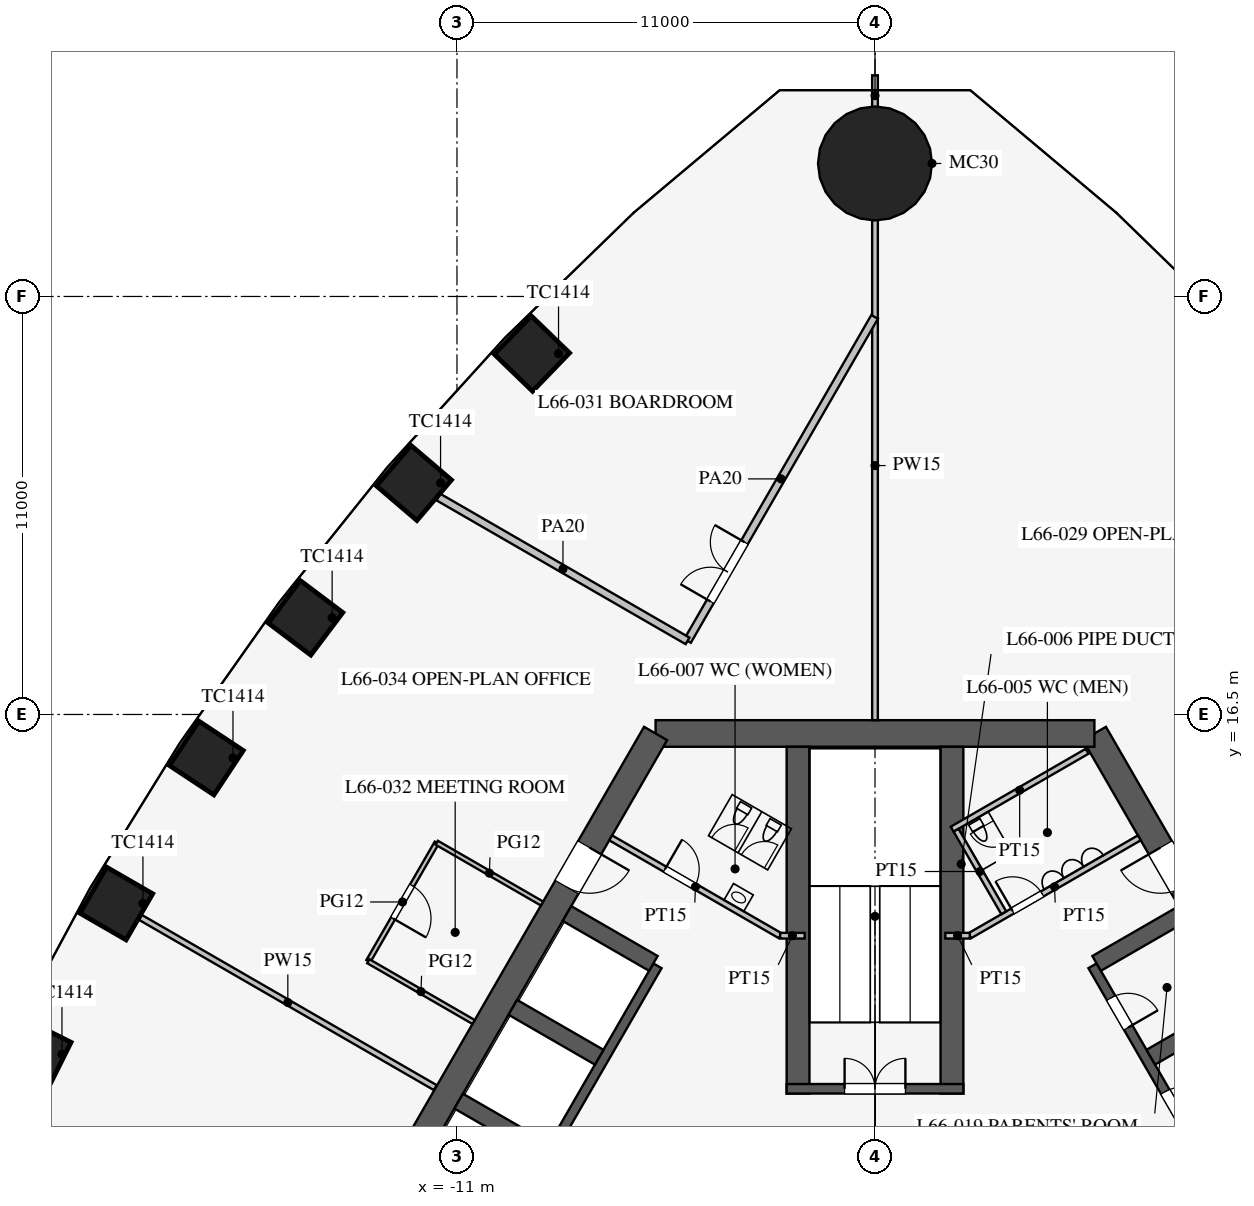
"""IFC4 building model, lengths in metres.
Left out: names, types, materials, properties, quantities, classifications, styles, units other than length and angle.
Written with IfcOpenShell. Run it as: python <this file> out.ifc"""

import sys

from ifc_helpers import new_model, si_unit, direction, frame, frame_2d, origin, origin_2d, place, context, subcontext, project, spatial, rectangle, circle, extrude, element, fill, save


model = new_model("IFC4")
c1 = context("Model", 3, precision=1e-05, world=origin(), true_north=direction((0.0, 1.0)))
c2 = subcontext(c1, "Body", "Model", "MODEL_VIEW")
j1 = project(units=[si_unit("LENGTHUNIT", "METRE"), si_unit("PLANEANGLEUNIT", "RADIAN")], contexts=[c1])
p1 = place(None, origin())
s1 = spatial("IfcSite", under=j1, at=p1, CompositionType="ELEMENT")
p2 = place(p1, origin())
s2 = spatial("IfcBuilding", under=s1, at=p2, CompositionType="ELEMENT")
p3 = place(p2, frame((0.0, 0.0, 288.9)))
s3 = spatial("IfcBuildingStorey", under=s2, at=p3, CompositionType="ELEMENT", Elevation=288.9)
for number, where, z_axis, x_axis in (
    (1, (-9.027, 25.997, 0.0), (0.0, 0.0, 1.0), (-0.695, -0.719, 0.0)),
    (2, (-12.132, 22.593, 0.0), (0.0, 0.0, 1.0), (-0.649, -0.761, 0.0)),
    (3, (-14.985, 19.044, 0.0), (0.0, 0.0, 1.0), (-0.601, -0.799, 0.0)),
    (4, (-17.594, 15.354, 0.0), (0.0, 0.0, 1.0), (-0.552, -0.834, 0.0)),
    (5, (-19.963, 11.526, 0.0), (0.0, 0.0, 1.0), (-0.5, -0.866, 0.0)),
    (6, (-22.094, 7.56, 0.0), (0.0, 0.0, 1.0), (-0.447, -0.895, 0.0)),
):
    element("IfcColumn", number, at=place(p3, frame(where, z_axis=z_axis, x_axis=x_axis)), inside=s3, PredefinedType="COLUMN", context=c2, shape_type="SweptSolid", body=[
        extrude(rectangle(XDim=1.4, YDim=1.4, at=origin_2d()), origin(), (0.0, 0.0, 1.0), 4.2),
    ])
p4 = place(p3, frame((0.0, 31.0, 0.0), z_axis=(0.0, 0.0, 1.0), x_axis=(1.0, 0.0, 0.0)))
e7 = element("IfcColumn", 7, at=p4, inside=s3, PredefinedType="COLUMN", context=c2, shape_type="SweptSolid", body=[
    extrude(circle(Radius=1.5, at=origin_2d()), origin(), (0.0, 0.0, 1.0), 4.2),
])
p5 = place(p3, frame((16.743, -3.0, 0.0), z_axis=(0.0, 0.0, 1.0), x_axis=(-0.500002442456, 0.866023993627, 0.0)))
e8 = element("IfcWall", 8, at=p5, inside=s3, PredefinedType="SHEAR", context=c2, shape_type="SweptSolid", body=[
    extrude(rectangle(XDim=21.939, YDim=0.7, at=frame_2d((10.97, 0.0))), origin(), (0.0, 0.0, 1.0), 4.2),
])
p6 = place(p5, frame((17.27, 0.0, 0.0)))
e9 = element("IfcOpeningElement", 9, at=p6, cuts=e8, PredefinedType="OPENING", context=c2, shape_type="SweptSolid", body=[
    extrude(rectangle(XDim=1.2, YDim=2.1, at=frame_2d((0.6, 1.05))), frame((0.0, 0.36, 0.0), z_axis=(0.0, -1.0, 0.0), x_axis=(1.0, 0.0, 0.0)), (0.0, 0.0, 1.0), 0.72),
])
p7 = place(p5, frame((3.47, 0.0, 0.0)))
e10 = element("IfcOpeningElement", 10, at=p7, cuts=e8, PredefinedType="OPENING", context=c2, shape_type="SweptSolid", body=[
    extrude(rectangle(XDim=1.2, YDim=2.1, at=frame_2d((0.6, 1.05))), frame((0.0, 0.36, 0.0), z_axis=(0.0, -1.0, 0.0), x_axis=(1.0, 0.0, 0.0)), (0.0, 0.0, 1.0), 0.72),
])
p8 = place(p3, frame((5.773, 16.0, 0.0), z_axis=(0.0, 0.0, 1.0), x_axis=(-1.0, 0.0, 0.0)))
e11 = element("IfcWall", 11, at=p8, inside=s3, PredefinedType="SHEAR", context=c2, shape_type="SweptSolid", body=[
    extrude(rectangle(XDim=11.547, YDim=0.7, at=frame_2d((5.773, 0.0))), origin(), (0.0, 0.0, 1.0), 4.2),
])
p9 = place(p3, frame((-5.773, 16.0, 0.0), z_axis=(0.0, 0.0, 1.0), x_axis=(-0.500002442456, -0.866023993627, 0.0)))
e12 = element("IfcWall", 12, at=p9, inside=s3, PredefinedType="SHEAR", context=c2, shape_type="SweptSolid", body=[
    extrude(rectangle(XDim=21.939, YDim=0.7, at=frame_2d((10.97, 0.0))), origin(), (0.0, 0.0, 1.0), 4.2),
])
p10 = place(p9, frame((17.27, 0.0, 0.0)))
e13 = element("IfcOpeningElement", 13, at=p10, cuts=e12, PredefinedType="OPENING", context=c2, shape_type="SweptSolid", body=[
    extrude(rectangle(XDim=1.2, YDim=2.1, at=frame_2d((0.6, 1.05))), frame((0.0, 0.36, 0.0), z_axis=(0.0, -1.0, 0.0), x_axis=(1.0, 0.0, 0.0)), (0.0, 0.0, 1.0), 0.72),
])
p11 = place(p9, frame((3.47, 0.0, 0.0)))
e14 = element("IfcOpeningElement", 14, at=p11, cuts=e12, PredefinedType="OPENING", context=c2, shape_type="SweptSolid", body=[
    extrude(rectangle(XDim=1.2, YDim=2.1, at=frame_2d((0.6, 1.05))), frame((0.0, 0.36, 0.0), z_axis=(0.0, -1.0, 0.0), x_axis=(1.0, 0.0, 0.0)), (0.0, 0.0, 1.0), 0.72),
])
p12 = place(p3, frame((11.424, 0.014, 0.0), z_axis=(0.0, 0.0, 1.0), x_axis=(-0.500001763848, 0.866024385424, 0.0)))
e15 = element("IfcWall", 15, at=p12, inside=s3, PredefinedType="SHEAR", context=c2, shape_type="SweptSolid", body=[
    extrude(rectangle(XDim=11.4, YDim=0.25, at=frame_2d((5.7, 0.0))), origin(), (0.0, 0.0, 1.0), 4.2),
])
p13 = place(p12, frame((0.975, 0.0, 0.0)))
e16 = element("IfcOpeningElement", 16, at=p13, cuts=e15, PredefinedType="OPENING", context=c2, shape_type="SweptSolid", body=[
    extrude(rectangle(XDim=0.9, YDim=2.1, at=frame_2d((0.45, 1.05))), frame((0.0, 0.135, 0.0), z_axis=(0.0, -1.0, 0.0), x_axis=(1.0, 0.0, 0.0)), (0.0, 0.0, 1.0), 0.27),
])
p14 = place(p12, frame((3.825, 0.0, 0.0)))
e17 = element("IfcOpeningElement", 17, at=p14, cuts=e15, PredefinedType="OPENING", context=c2, shape_type="SweptSolid", body=[
    extrude(rectangle(XDim=0.9, YDim=2.1, at=frame_2d((0.45, 1.05))), frame((0.0, 0.135, 0.0), z_axis=(0.0, -1.0, 0.0), x_axis=(1.0, 0.0, 0.0)), (0.0, 0.0, 1.0), 0.27),
])
p15 = place(p12, frame((6.675, 0.0, 0.0)))
e18 = element("IfcOpeningElement", 18, at=p15, cuts=e15, PredefinedType="OPENING", context=c2, shape_type="SweptSolid", body=[
    extrude(rectangle(XDim=0.9, YDim=2.1, at=frame_2d((0.45, 1.05))), frame((0.0, 0.135, 0.0), z_axis=(0.0, -1.0, 0.0), x_axis=(1.0, 0.0, 0.0)), (0.0, 0.0, 1.0), 0.27),
])
p16 = place(p12, frame((9.525, 0.0, 0.0)))
e19 = element("IfcOpeningElement", 19, at=p16, cuts=e15, PredefinedType="OPENING", context=c2, shape_type="SweptSolid", body=[
    extrude(rectangle(XDim=0.9, YDim=2.1, at=frame_2d((0.45, 1.05))), frame((0.0, 0.135, 0.0), z_axis=(0.0, -1.0, 0.0), x_axis=(1.0, 0.0, 0.0)), (0.0, 0.0, 1.0), 0.27),
])
for number, where, z_axis, x_axis in (
    (20, (7.257, 7.481, 0.0), (0.0, 0.0, 1.0), (0.866, 0.5, 0.0)),
    (21, (5.832, 9.949, 0.0), (0.0, 0.0, 1.0), (0.866, 0.5, 0.0)),
):
    element("IfcWall", number, at=place(p3, frame(where, z_axis=z_axis, x_axis=x_axis)), inside=s3, PredefinedType="SHEAR", context=c2, shape_type="SweptSolid", body=[
        extrude(rectangle(XDim=2.625, YDim=0.45, at=frame_2d((1.312, 0.0))), origin(), (0.0, 0.0, 1.0), 4.2),
    ])
p17 = place(p3, frame((-5.724, 9.886, 0.0), z_axis=(0.0, 0.0, 1.0), x_axis=(-0.500001763848, -0.866024385424, 0.0)))
e22 = element("IfcWall", 22, at=p17, inside=s3, PredefinedType="SHEAR", context=c2, shape_type="SweptSolid", body=[
    extrude(rectangle(XDim=11.4, YDim=0.25, at=frame_2d((5.7, 0.0))), origin(), (0.0, 0.0, 1.0), 4.2),
])
p18 = place(p17, frame((6.525, 0.0, 0.0)))
e23 = element("IfcOpeningElement", 23, at=p18, cuts=e22, PredefinedType="OPENING", context=c2, shape_type="SweptSolid", body=[
    extrude(rectangle(XDim=1.2, YDim=2.2, at=frame_2d((0.6, 1.1))), frame((0.0, 0.135, 0.0), z_axis=(0.0, -1.0, 0.0), x_axis=(1.0, 0.0, 0.0)), (0.0, 0.0, 1.0), 0.27),
])
p19 = place(p17, frame((9.375, 0.0, 0.0)))
e24 = element("IfcOpeningElement", 24, at=p19, cuts=e22, PredefinedType="OPENING", context=c2, shape_type="SweptSolid", body=[
    extrude(rectangle(XDim=1.2, YDim=2.2, at=frame_2d((0.6, 1.1))), frame((0.0, 0.135, 0.0), z_axis=(0.0, -1.0, 0.0), x_axis=(1.0, 0.0, 0.0)), (0.0, 0.0, 1.0), 0.27),
])
for number, where, z_axis, x_axis in (
    (25, (-5.832, 9.949, 0.0), (0.0, 0.0, 1.0), (-0.866, 0.5, 0.0)),
    (26, (-7.257, 7.481, 0.0), (0.0, 0.0, 1.0), (-0.866, 0.5, 0.0)),
    (27, (-8.682, 5.012, 0.0), (0.0, 0.0, 1.0), (-0.866, 0.5, 0.0)),
):
    element("IfcWall", number, at=place(p3, frame(where, z_axis=z_axis, x_axis=x_axis)), inside=s3, PredefinedType="SHEAR", context=c2, shape_type="SweptSolid", body=[
        extrude(rectangle(XDim=2.625, YDim=0.45, at=frame_2d((1.312, 0.0))), origin(), (0.0, 0.0, 1.0), 4.2),
    ])
for number, where, z_axis, x_axis in (
    (28, (2.025, 6.525, 0.0), (0.0, 0.0, 1.0), (0.0, 1.0, 0.0)),
    (29, (-2.025, 6.525, 0.0), (0.0, 0.0, 1.0), (0.0, 1.0, 0.0)),
):
    element("IfcWall", number, at=place(p3, frame(where, z_axis=z_axis, x_axis=x_axis)), inside=s3, PredefinedType="SHEAR", context=c2, shape_type="SweptSolid", body=[
        extrude(rectangle(XDim=9.125, YDim=0.6, at=frame_2d((4.562, 0.0))), origin(), (0.0, 0.0, 1.0), 4.2),
    ])
p20 = place(p3, frame((2.325, 6.65, 0.0), z_axis=(0.0, 0.0, 1.0), x_axis=(-1.0, 0.0, 0.0)))
e30 = element("IfcWall", 30, at=p20, inside=s3, PredefinedType="SHEAR", context=c2, shape_type="SweptSolid", body=[
    extrude(rectangle(XDim=4.65, YDim=0.25, at=frame_2d((2.325, 0.0))), origin(), (0.0, 0.0, 1.0), 4.2),
])
p21 = place(p20, frame((1.525, 0.0, 0.0)))
e31 = element("IfcOpeningElement", 31, at=p21, cuts=e30, PredefinedType="OPENING", context=c2, shape_type="SweptSolid", body=[
    extrude(rectangle(XDim=1.6, YDim=2.1, at=frame_2d((0.8, 1.05))), frame((0.0, 0.135, 0.0), z_axis=(0.0, -1.0, 0.0), x_axis=(1.0, 0.0, 0.0)), (0.0, 0.0, 1.0), 0.27),
])
p22 = place(p3, frame((2.495, 10.678, 0.0), z_axis=(0.0, 0.0, 1.0), x_axis=(0.866037967349, 0.499978238636, 0.0)))
e32 = element("IfcWall", 32, at=p22, inside=s3, PredefinedType="PARTITIONING", context=c2, shape_type="SweptSolid", body=[
    extrude(rectangle(XDim=5.15, YDim=0.15, at=frame_2d((2.575, 0.0))), origin(), (0.0, 0.0, 1.0), 4.0),
])
p23 = place(p22, frame((1.3, 0.0, 0.0)))
e33 = element("IfcOpeningElement", 33, at=p23, cuts=e32, PredefinedType="OPENING", context=c2, shape_type="SweptSolid", body=[
    extrude(rectangle(XDim=0.9, YDim=2.1, at=frame_2d((0.45, 1.05))), frame((0.0, 0.085, 0.0), z_axis=(0.0, -1.0, 0.0), x_axis=(1.0, 0.0, 0.0)), (0.0, 0.0, 1.0), 0.17),
])
p24 = place(p3, frame((-2.495, 10.678, 0.0), z_axis=(0.0, 0.0, 1.0), x_axis=(-0.866037967349, 0.499978238636, 0.0)))
e34 = element("IfcWall", 34, at=p24, inside=s3, PredefinedType="PARTITIONING", context=c2, shape_type="SweptSolid", body=[
    extrude(rectangle(XDim=5.15, YDim=0.15, at=frame_2d((2.575, 0.0))), origin(), (0.0, 0.0, 1.0), 4.0),
])
p25 = place(p24, frame((2.6, 0.0, 0.0)))
e35 = element("IfcOpeningElement", 35, at=p25, cuts=e34, PredefinedType="OPENING", context=c2, shape_type="SweptSolid", body=[
    extrude(rectangle(XDim=0.9, YDim=2.1, at=frame_2d((0.45, 1.05))), frame((0.0, 0.085, 0.0), z_axis=(0.0, -1.0, 0.0), x_axis=(1.0, 0.0, 0.0)), (0.0, 0.0, 1.0), 0.17),
])
for number, where, z_axis, x_axis in (
    (36, (2.495, 10.678, 0.0), (0.0, 0.0, 1.0), (-1.0, 0.0, 0.0)),
    (37, (-2.495, 10.678, 0.0), (0.0, 0.0, 1.0), (1.0, 0.0, 0.0)),
):
    element("IfcWall", number, at=place(p3, frame(where, z_axis=z_axis, x_axis=x_axis)), inside=s3, PredefinedType="PARTITIONING", context=c2, shape_type="SweptSolid", body=[
        extrude(rectangle(XDim=0.645, YDim=0.15, at=frame_2d((0.323, 0.0))), origin(), (0.0, 0.0, 1.0), 4.0),
    ])
p26 = place(p3, frame((2.031, 13.482, 0.0), z_axis=(0.0, 0.0, 1.0), x_axis=(0.866050731258, 0.499956128963, 0.0)))
e38 = element("IfcWall", 38, at=p26, inside=s3, PredefinedType="PARTITIONING", context=c2, shape_type="SweptSolid", body=[
    extrude(rectangle(XDim=4.1, YDim=0.15, at=frame_2d((2.05, 0.0))), origin(), (0.0, 0.0, 1.0), 4.0),
])
p27 = place(p3, frame((3.389, 11.281, 0.0), z_axis=(0.0, 0.0, 1.0), x_axis=(-0.499989096993, 0.866031698547, 0.0)))
e39 = element("IfcWall", 39, at=p27, inside=s3, PredefinedType="PARTITIONING", context=c2, shape_type="SweptSolid", body=[
    extrude(rectangle(XDim=2.51, YDim=0.15, at=frame_2d((1.255, 0.0))), origin(), (0.0, 0.0, 1.0), 4.0),
])
p28 = place(p3, frame((0.0, 16.35, 0.0), z_axis=(0.0, 0.0, 1.0), x_axis=(0.0, 1.0, 0.0)))
e40 = element("IfcWall", 40, at=p28, inside=s3, PredefinedType="PARTITIONING", context=c2, shape_type="SweptSolid", body=[
    extrude(rectangle(XDim=13.4, YDim=0.15, at=frame_2d((6.7, 0.0))), origin(), (0.0, 0.0, 1.0), 2.5),
])
p29 = place(p3, frame((0.0, 32.25, 0.0), z_axis=(0.0, 0.0, 1.0), x_axis=(0.0, 1.0, 0.0)))
e41 = element("IfcWall", 41, at=p29, inside=s3, PredefinedType="PARTITIONING", context=c2, shape_type="SweptSolid", body=[
    extrude(rectangle(XDim=1.07, YDim=0.15, at=frame_2d((0.535, 0.0))), origin(), (0.0, 0.0, 1.0), 2.5),
])
p30 = place(p3, frame((-4.933, 18.436, 0.0), z_axis=(0.0, 0.0, 1.0), x_axis=(0.500003655525, 0.866023293256, 0.0)))
e42 = element("IfcWall", 42, at=p30, inside=s3, PredefinedType="PARTITIONING", context=c2, shape_type="SweptSolid", body=[
    extrude(rectangle(XDim=9.845, YDim=0.2, at=frame_2d((4.923, 0.0))), origin(), (0.0, 0.0, 1.0), 2.9),
])
p31 = place(p30, frame((1.2, 0.0, 0.15)))
e43 = element("IfcOpeningElement", 43, at=p31, cuts=e42, PredefinedType="OPENING", context=c2, shape_type="SweptSolid", body=[
    extrude(rectangle(XDim=1.8, YDim=2.1, at=frame_2d((0.9, 1.05))), frame((0.0, 0.11, 0.0), z_axis=(0.0, -1.0, 0.0), x_axis=(1.0, 0.0, 0.0)), (0.0, 0.0, 1.0), 0.22),
])
p32 = place(p3, frame((-11.57, 6.68, 0.0), z_axis=(0.0, 0.0, 1.0), x_axis=(-0.866018180823, 0.500012510328, 0.0)))
e44 = element("IfcWall", 44, at=p32, inside=s3, PredefinedType="PARTITIONING", context=c2, shape_type="SweptSolid", body=[
    extrude(rectangle(XDim=8.962, YDim=0.15, at=frame_2d((4.481, 0.0))), origin(), (0.0, 0.0, 1.0), 3.3),
])
p33 = place(p3, frame((-11.533, 13.125, 0.0), z_axis=(0.0, 0.0, 1.0), x_axis=(-0.500012057535, -0.866018442252, 0.0)))
e45 = element("IfcWall", 45, at=p33, inside=s3, PredefinedType="PARTITIONING", context=c2, shape_type="SweptSolid", body=[
    extrude(rectangle(XDim=3.6, YDim=0.12, at=frame_2d((1.8, 0.0))), origin(), (0.0, 0.0, 1.0), 2.9),
])
p34 = place(p33, frame((1.3, 0.0, 0.15)))
e46 = element("IfcOpeningElement", 46, at=p34, cuts=e45, PredefinedType="OPENING", context=c2, shape_type="SweptSolid", body=[
    extrude(rectangle(XDim=1.0, YDim=2.1, at=frame_2d((0.5, 1.05))), frame((0.0, 0.07, 0.0), z_axis=(0.0, -1.0, 0.0), x_axis=(1.0, 0.0, 0.0)), (0.0, 0.0, 1.0), 0.14),
])
for number, where, z_axis, x_axis in (
    (47, (-10.562, 8.407, 0.0), (0.0, 0.0, 1.0), (-0.866, 0.5, 0.0)),
    (48, (-8.761, 11.525, 0.0), (0.0, 0.0, 1.0), (-0.866, 0.5, 0.0)),
):
    element("IfcWall", number, at=place(p3, frame(where, z_axis=z_axis, x_axis=x_axis)), inside=s3, PredefinedType="PARTITIONING", context=c2, shape_type="SweptSolid", body=[
        extrude(rectangle(XDim=3.2, YDim=0.12, at=frame_2d((1.6, 0.0))), origin(), (0.0, 0.0, 1.0), 2.9),
    ])
p35 = place(p3, frame((-4.933, 18.436, 0.0), z_axis=(0.0, 0.0, 1.0), x_axis=(-0.866021793822, 0.500006252586, 0.0)))
e49 = element("IfcWall", 49, at=p35, inside=s3, PredefinedType="PARTITIONING", context=c2, shape_type="SweptSolid", body=[
    extrude(rectangle(XDim=7.571, YDim=0.2, at=frame_2d((3.785, 0.0))), origin(), (0.0, 0.0, 1.0), 2.9),
])
p36 = place(p23, origin())
e50 = element("IfcDoor", 50, at=p36, inside=s3, OperationType="SINGLE_SWING_LEFT", PredefinedType="DOOR", context=c2, shape_type="SweptSolid", body=[
    extrude(rectangle(XDim=0.9, YDim=2.1, at=frame_2d((0.45, 1.05))), frame((0.0, 0.025, 0.0), z_axis=(0.0, -1.0, 0.0), x_axis=(1.0, 0.0, 0.0)), (0.0, 0.0, 1.0), 0.05),
])
fill(e33, e50)
p37 = place(p25, frame((0.9, 0.0, 0.0), z_axis=(0.0, 0.0, 1.0), x_axis=(-1.0, 0.0, 0.0)))
e51 = element("IfcDoor", 51, at=p37, inside=s3, OperationType="SINGLE_SWING_LEFT", PredefinedType="DOOR", context=c2, shape_type="SweptSolid", body=[
    extrude(rectangle(XDim=0.9, YDim=2.1, at=frame_2d((0.45, 1.05))), frame((0.0, 0.025, 0.0), z_axis=(0.0, -1.0, 0.0), x_axis=(1.0, 0.0, 0.0)), (0.0, 0.0, 1.0), 0.05),
])
fill(e35, e51)
p38 = place(p21, frame((1.6, 0.0, 0.0), z_axis=(0.0, 0.0, 1.0), x_axis=(-1.0, 0.0, 0.0)))
e52 = element("IfcDoor", 52, at=p38, inside=s3, OperationType="DOUBLE_DOOR_SINGLE_SWING", PredefinedType="DOOR", context=c2, shape_type="SweptSolid", body=[
    extrude(rectangle(XDim=1.6, YDim=2.1, at=frame_2d((0.8, 1.05))), frame((0.0, 0.025, 0.0), z_axis=(0.0, -1.0, 0.0), x_axis=(1.0, 0.0, 0.0)), (0.0, 0.0, 1.0), 0.05),
])
fill(e31, e52)
p39 = place(p6, origin())
e53 = element("IfcDoor", 53, at=p39, inside=s3, OperationType="SINGLE_SWING_RIGHT", PredefinedType="DOOR", context=c2, shape_type="SweptSolid", body=[
    extrude(rectangle(XDim=1.2, YDim=2.1, at=frame_2d((0.6, 1.05))), frame((0.0, 0.025, 0.0), z_axis=(0.0, -1.0, 0.0), x_axis=(1.0, 0.0, 0.0)), (0.0, 0.0, 1.0), 0.05),
])
fill(e9, e53)
p40 = place(p11, origin())
e54 = element("IfcDoor", 54, at=p40, inside=s3, OperationType="SINGLE_SWING_LEFT", PredefinedType="DOOR", context=c2, shape_type="SweptSolid", body=[
    extrude(rectangle(XDim=1.2, YDim=2.1, at=frame_2d((0.6, 1.05))), frame((0.0, 0.025, 0.0), z_axis=(0.0, -1.0, 0.0), x_axis=(1.0, 0.0, 0.0)), (0.0, 0.0, 1.0), 0.05),
])
fill(e14, e54)
p41 = place(p15, frame((0.9, 0.0, 0.0), z_axis=(0.0, 0.0, 1.0), x_axis=(-1.0, 0.0, 0.0)))
e55 = element("IfcDoor", 55, at=p41, inside=s3, OperationType="SINGLE_SWING_RIGHT", PredefinedType="DOOR", context=c2, shape_type="SweptSolid", body=[
    extrude(rectangle(XDim=0.9, YDim=2.1, at=frame_2d((0.45, 1.05))), frame((0.0, 0.025, 0.0), z_axis=(0.0, -1.0, 0.0), x_axis=(1.0, 0.0, 0.0)), (0.0, 0.0, 1.0), 0.05),
])
fill(e18, e55)
p42 = place(p16, frame((0.9, 0.0, 0.0), z_axis=(0.0, 0.0, 1.0), x_axis=(-1.0, 0.0, 0.0)))
e56 = element("IfcDoor", 56, at=p42, inside=s3, OperationType="SINGLE_SWING_RIGHT", PredefinedType="DOOR", context=c2, shape_type="SweptSolid", body=[
    extrude(rectangle(XDim=0.9, YDim=2.1, at=frame_2d((0.45, 1.05))), frame((0.0, 0.025, 0.0), z_axis=(0.0, -1.0, 0.0), x_axis=(1.0, 0.0, 0.0)), (0.0, 0.0, 1.0), 0.05),
])
fill(e19, e56)
p43 = place(p31, origin())
e57 = element("IfcDoor", 57, at=p43, inside=s3, OperationType="DOUBLE_DOOR_SINGLE_SWING", PredefinedType="DOOR", context=c2, shape_type="SweptSolid", body=[
    extrude(rectangle(XDim=1.8, YDim=2.1, at=frame_2d((0.9, 1.05))), frame((0.0, 0.025, 0.0), z_axis=(0.0, -1.0, 0.0), x_axis=(1.0, 0.0, 0.0)), (0.0, 0.0, 1.0), 0.05),
])
fill(e43, e57)
p44 = place(p34, origin())
e58 = element("IfcDoor", 58, at=p44, inside=s3, OperationType="SINGLE_SWING_RIGHT", PredefinedType="DOOR", context=c2, shape_type="SweptSolid", body=[
    extrude(rectangle(XDim=1.0, YDim=2.1, at=frame_2d((0.5, 1.05))), frame((0.0, 0.025, 0.0), z_axis=(0.0, -1.0, 0.0), x_axis=(1.0, 0.0, 0.0)), (0.0, 0.0, 1.0), 0.05),
])
fill(e46, e58)
save(model, sys.argv[1])
